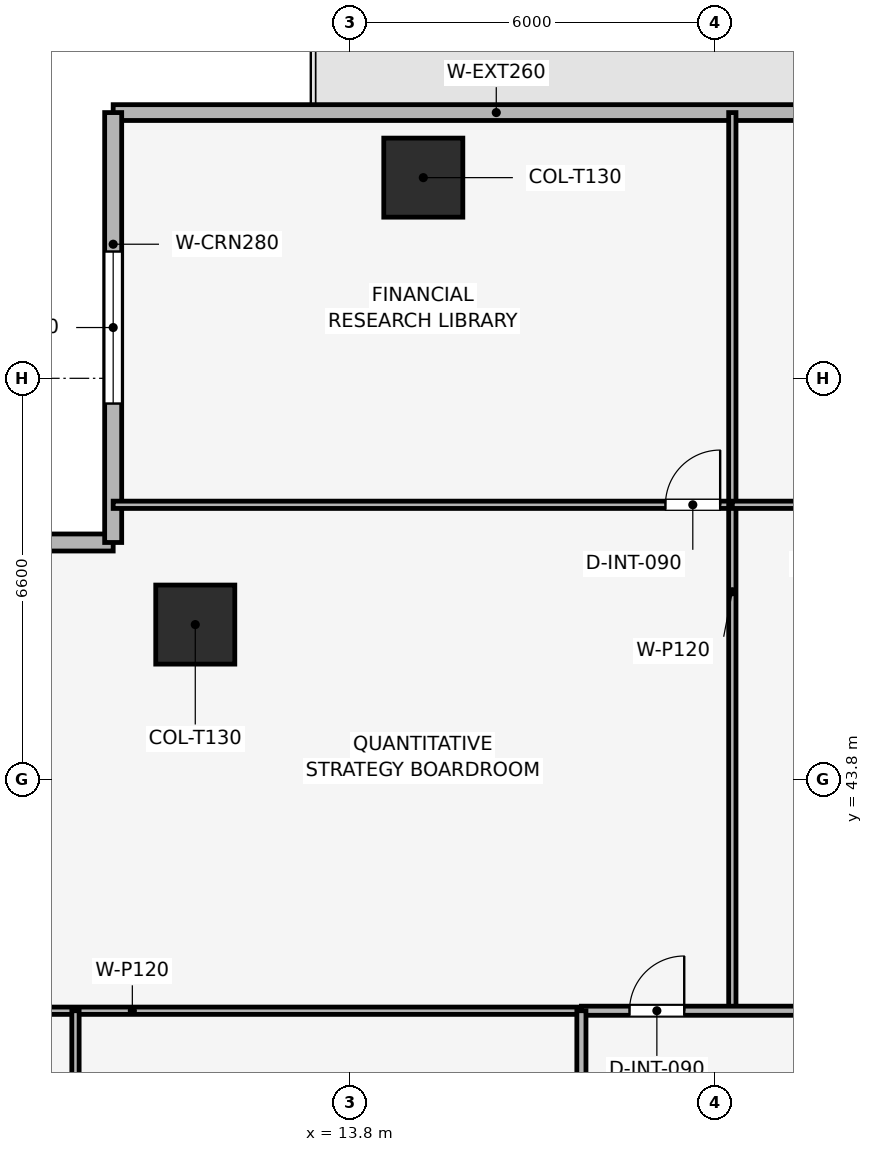
"""IFC4 building model, lengths in metres.
Left out: names, types, materials, properties, quantities, classifications, styles, units other than length and angle.
Written with IfcOpenShell. Run it as: python <this file> out.ifc"""

import sys

from ifc_helpers import new_model, si_unit, direction, frame, frame_2d, origin, origin_2d, place, context, subcontext, project, spatial, rectangle, extrude, element, fill, save


model = new_model("IFC4")
c1 = context("Model", 3, precision=1e-05, world=origin(), true_north=direction((0.0, 1.0)))
c2 = subcontext(c1, "Body", "Model", "MODEL_VIEW")
j1 = project(units=[si_unit("LENGTHUNIT", "METRE"), si_unit("PLANEANGLEUNIT", "RADIAN")], contexts=[c1])
p1 = place(None, origin())
s1 = spatial("IfcSite", under=j1, at=p1, CompositionType="ELEMENT")
p2 = place(p1, origin())
s2 = spatial("IfcBuilding", under=s1, at=p2, CompositionType="ELEMENT")
p3 = place(p2, frame((0.0, 0.0, 129.0)))
s3 = spatial("IfcBuildingStorey", under=s2, at=p3, CompositionType="ELEMENT", Elevation=129.0)
for number, where, z_axis, x_axis in (
    (1, (15.0, 53.7, 0.003), (0.0, 0.0, 1.0), (1.0, 0.0, 0.0)),
    (2, (11.25, 46.35, 0.003), (0.0, 0.0, 1.0), (1.0, 0.0, 0.0)),
):
    element("IfcColumn", number, at=place(p3, frame(where, z_axis=z_axis, x_axis=x_axis)), inside=s3, PredefinedType="COLUMN", context=c2, shape_type="SweptSolid", body=[
        extrude(rectangle(XDim=1.3, YDim=1.3, at=origin_2d()), origin(), (0.0, 0.0, 1.0), 3.644),
    ])
p4 = place(p3, frame((9.9, 54.77, 0.0), z_axis=(0.0, 0.0, 1.0), x_axis=(1.0, 0.0, 0.0)))
e3 = element("IfcWall", 3, at=p4, inside=s3, PredefinedType="SOLIDWALL", context=c2, shape_type="SweptSolid", body=[
    extrude(rectangle(XDim=14.1, YDim=0.26, at=frame_2d((7.05, 0.0))), origin(), (0.0, 0.0, 1.0), 3.65),
])
p5 = place(p4, frame((12.75, 0.0, 0.0)))
e4 = element("IfcOpeningElement", 4, at=p5, cuts=e3, PredefinedType="OPENING", context=c2, shape_type="SweptSolid", body=[
    extrude(rectangle(XDim=1.1, YDim=2.2, at=frame_2d((0.55, 1.1))), frame((0.0, 0.14, 0.0), z_axis=(0.0, -1.0, 0.0), x_axis=(1.0, 0.0, 0.0)), (0.0, 0.0, 1.0), 0.28),
])
p6 = place(p3, frame((2.83, 47.7, 0.0), z_axis=(0.0, 0.0, 1.0), x_axis=(1.0, 0.0, 0.0)))
e5 = element("IfcWall", 5, at=p6, inside=s3, PredefinedType="SOLIDWALL", context=c2, shape_type="SweptSolid", body=[
    extrude(rectangle(XDim=7.07, YDim=0.28, at=frame_2d((3.535, 0.0))), origin(), (0.0, 0.0, 1.0), 3.65),
])
p7 = place(p6, frame((2.285, 0.0, 0.72)))
e6 = element("IfcOpeningElement", 6, at=p7, cuts=e5, PredefinedType="OPENING", context=c2, shape_type="SweptSolid", body=[
    extrude(rectangle(XDim=2.5, YDim=1.9, at=frame_2d((1.25, 0.95))), frame((0.0, 0.15, 0.0), z_axis=(0.0, -1.0, 0.0), x_axis=(1.0, 0.0, 0.0)), (0.0, 0.0, 1.0), 0.3),
])
p8 = place(p3, frame((9.9, 47.7, 0.0), z_axis=(0.0, 0.0, 1.0), x_axis=(0.0, 1.0, 0.0)))
e7 = element("IfcWall", 7, at=p8, inside=s3, PredefinedType="SOLIDWALL", context=c2, shape_type="SweptSolid", body=[
    extrude(rectangle(XDim=7.07, YDim=0.28, at=frame_2d((3.535, 0.0))), origin(), (0.0, 0.0, 1.0), 3.65),
])
p9 = place(p8, frame((2.285, 0.0, 0.72)))
e8 = element("IfcOpeningElement", 8, at=p9, cuts=e7, PredefinedType="OPENING", context=c2, shape_type="SweptSolid", body=[
    extrude(rectangle(XDim=2.5, YDim=1.9, at=frame_2d((1.25, 0.95))), frame((0.0, 0.15, 0.0), z_axis=(0.0, -1.0, 0.0), x_axis=(1.0, 0.0, 0.0)), (0.0, 0.0, 1.0), 0.3),
])
p10 = place(p3, frame((9.9, 48.32, 0.0), z_axis=(0.0, 0.0, 1.0), x_axis=(1.0, 0.0, 0.0)))
e9 = element("IfcWall", 9, at=p10, inside=s3, PredefinedType="PARTITIONING", context=c2, shape_type="SweptSolid", body=[
    extrude(rectangle(XDim=10.182, YDim=0.12, at=frame_2d((5.091, 0.0))), origin(), (0.0, 0.0, 1.0), 2.835),
])
p11 = place(p10, frame((9.082, 0.0, 0.0)))
e10 = element("IfcOpeningElement", 10, at=p11, cuts=e9, PredefinedType="OPENING", context=c2, shape_type="SweptSolid", body=[
    extrude(rectangle(XDim=0.9, YDim=2.1, at=frame_2d((0.45, 1.05))), frame((0.0, 0.07, 0.0), z_axis=(0.0, -1.0, 0.0), x_axis=(1.0, 0.0, 0.0)), (0.0, 0.0, 1.0), 0.14),
])
p12 = place(p3, frame((20.082, 40.0, 0.0), z_axis=(0.0, 0.0, 1.0), x_axis=(0.0, 1.0, 0.0)))
e11 = element("IfcWall", 11, at=p12, inside=s3, PredefinedType="PARTITIONING", context=c2, shape_type="SweptSolid", body=[
    extrude(rectangle(XDim=14.77, YDim=0.12, at=frame_2d((7.385, 0.0))), origin(), (0.0, 0.0, 1.0), 2.835),
])
p13 = place(p3, frame((20.082, 48.32, 0.0), z_axis=(0.0, 0.0, 1.0), x_axis=(1.0, 0.0, 0.0)))
e12 = element("IfcWall", 12, at=p13, inside=s3, PredefinedType="PARTITIONING", context=c2, shape_type="SweptSolid", body=[
    extrude(rectangle(XDim=5.764, YDim=0.12, at=frame_2d((2.882, 0.0))), origin(), (0.0, 0.0, 1.0), 3.185),
])
p14 = place(p13, frame((1.316, 0.0, 0.0)))
e13 = element("IfcOpeningElement", 13, at=p14, cuts=e12, PredefinedType="OPENING", context=c2, shape_type="SweptSolid", body=[
    extrude(rectangle(XDim=0.9, YDim=2.1, at=frame_2d((0.45, 1.05))), frame((0.0, 0.07, 0.0), z_axis=(0.0, -1.0, 0.0), x_axis=(1.0, 0.0, 0.0)), (0.0, 0.0, 1.0), 0.14),
])
p15 = place(p3, frame((2.83, 40.0, 0.0), z_axis=(0.0, 0.0, 1.0), x_axis=(1.0, 0.0, 0.0)))
e14 = element("IfcWall", 14, at=p15, inside=s3, PredefinedType="PARTITIONING", context=c2, shape_type="SweptSolid", body=[
    extrude(rectangle(XDim=14.77, YDim=0.12, at=frame_2d((7.385, 0.0))), origin(), (0.0, 0.0, 1.0), 2.835),
])
p16 = place(p3, frame((9.28, 17.6, 0.0), z_axis=(0.0, 0.0, 1.0), x_axis=(0.0, 1.0, 0.0)))
e15 = element("IfcWall", 15, at=p16, inside=s3, PredefinedType="PARTITIONING", context=c2, shape_type="SweptSolid", body=[
    extrude(rectangle(XDim=22.4, YDim=0.12, at=frame_2d((11.2, 0.0))), origin(), (0.0, 0.0, 1.0), 3.185),
])
p17 = place(p16, frame((17.783, 0.0, 0.0)))
e16 = element("IfcOpeningElement", 16, at=p17, cuts=e15, PredefinedType="OPENING", context=c2, shape_type="SweptSolid", body=[
    extrude(rectangle(XDim=0.9, YDim=2.1, at=frame_2d((0.45, 1.05))), frame((0.0, 0.07, 0.0), z_axis=(0.0, -1.0, 0.0), x_axis=(1.0, 0.0, 0.0)), (0.0, 0.0, 1.0), 0.14),
])
p18 = place(p3, frame((17.6, 40.0, 0.0), z_axis=(0.0, 0.0, 1.0), x_axis=(1.0, 0.0, 0.0)))
e17 = element("IfcWall", 17, at=p18, inside=s3, PredefinedType="PARTITIONING", context=c2, shape_type="SweptSolid", body=[
    extrude(rectangle(XDim=22.4, YDim=0.15, at=frame_2d((11.2, 0.0))), origin(), (0.0, 0.0, 1.0), 3.185),
])
p19 = place(p18, frame((0.791, 0.0, 0.0)))
e18 = element("IfcOpeningElement", 18, at=p19, cuts=e17, PredefinedType="OPENING", context=c2, shape_type="SweptSolid", body=[
    extrude(rectangle(XDim=0.9, YDim=2.1, at=frame_2d((0.45, 1.05))), frame((0.0, 0.085, 0.0), z_axis=(0.0, -1.0, 0.0), x_axis=(1.0, 0.0, 0.0)), (0.0, 0.0, 1.0), 0.17),
])
p20 = place(p18, frame((4.914, 0.0, 0.0)))
e19 = element("IfcOpeningElement", 19, at=p20, cuts=e17, PredefinedType="OPENING", context=c2, shape_type="SweptSolid", body=[
    extrude(rectangle(XDim=0.9, YDim=2.1, at=frame_2d((0.45, 1.05))), frame((0.0, 0.085, 0.0), z_axis=(0.0, -1.0, 0.0), x_axis=(1.0, 0.0, 0.0)), (0.0, 0.0, 1.0), 0.17),
])
p21 = place(p18, frame((10.678, 0.0, 0.0)))
e20 = element("IfcOpeningElement", 20, at=p21, cuts=e17, PredefinedType="OPENING", context=c2, shape_type="SweptSolid", body=[
    extrude(rectangle(XDim=0.9, YDim=2.1, at=frame_2d((0.45, 1.05))), frame((0.0, 0.085, 0.0), z_axis=(0.0, -1.0, 0.0), x_axis=(1.0, 0.0, 0.0)), (0.0, 0.0, 1.0), 0.17),
])
p22 = place(p18, frame((17.755, 0.0, 0.0)))
e21 = element("IfcOpeningElement", 21, at=p22, cuts=e17, PredefinedType="OPENING", context=c2, shape_type="SweptSolid", body=[
    extrude(rectangle(XDim=0.9, YDim=2.1, at=frame_2d((0.45, 1.05))), frame((0.0, 0.085, 0.0), z_axis=(0.0, -1.0, 0.0), x_axis=(1.0, 0.0, 0.0)), (0.0, 0.0, 1.0), 0.17),
])
p23 = place(p3, frame((17.6, 17.6, 0.0), z_axis=(0.0, 0.0, 1.0), x_axis=(0.0, 1.0, 0.0)))
e22 = element("IfcWall", 22, at=p23, inside=s3, PredefinedType="PARTITIONING", context=c2, shape_type="SweptSolid", body=[
    extrude(rectangle(XDim=22.4, YDim=0.15, at=frame_2d((11.2, 0.0))), origin(), (0.0, 0.0, 1.0), 3.185),
])
p24 = place(p23, frame((10.75, 0.0, 0.0)))
e23 = element("IfcOpeningElement", 23, at=p24, cuts=e22, PredefinedType="OPENING", context=c2, shape_type="SweptSolid", body=[
    extrude(rectangle(XDim=0.9, YDim=2.1, at=frame_2d((0.45, 1.05))), frame((0.0, 0.085, 0.0), z_axis=(0.0, -1.0, 0.0), x_axis=(1.0, 0.0, 0.0)), (0.0, 0.0, 1.0), 0.17),
])
p25 = place(p9, origin())
e24 = element("IfcWindow", 24, at=p25, inside=s3, PartitioningType="SINGLE_PANEL", PredefinedType="WINDOW", context=c2, shape_type="SweptSolid", body=[
    extrude(rectangle(XDim=2.5, YDim=1.9, at=frame_2d((1.25, 0.95))), frame((0.0, 0.03, 0.0), z_axis=(0.0, -1.0, 0.0), x_axis=(1.0, 0.0, 0.0)), (0.0, 0.0, 1.0), 0.06),
])
fill(e8, e24)
p26 = place(p11, origin())
e25 = element("IfcDoor", 25, at=p26, inside=s3, OperationType="SINGLE_SWING_RIGHT", PredefinedType="DOOR", context=c2, shape_type="SweptSolid", body=[
    extrude(rectangle(XDim=0.9, YDim=2.1, at=frame_2d((0.45, 1.05))), frame((0.0, 0.025, 0.0), z_axis=(0.0, -1.0, 0.0), x_axis=(1.0, 0.0, 0.0)), (0.0, 0.0, 1.0), 0.05),
])
fill(e10, e25)
p27 = place(p19, origin())
e26 = element("IfcDoor", 26, at=p27, inside=s3, OperationType="SINGLE_SWING_RIGHT", PredefinedType="DOOR", context=c2, shape_type="SweptSolid", body=[
    extrude(rectangle(XDim=0.9, YDim=2.1, at=frame_2d((0.45, 1.05))), frame((0.0, 0.025, 0.0), z_axis=(0.0, -1.0, 0.0), x_axis=(1.0, 0.0, 0.0)), (0.0, 0.0, 1.0), 0.05),
])
fill(e18, e26)
save(model, sys.argv[1])
